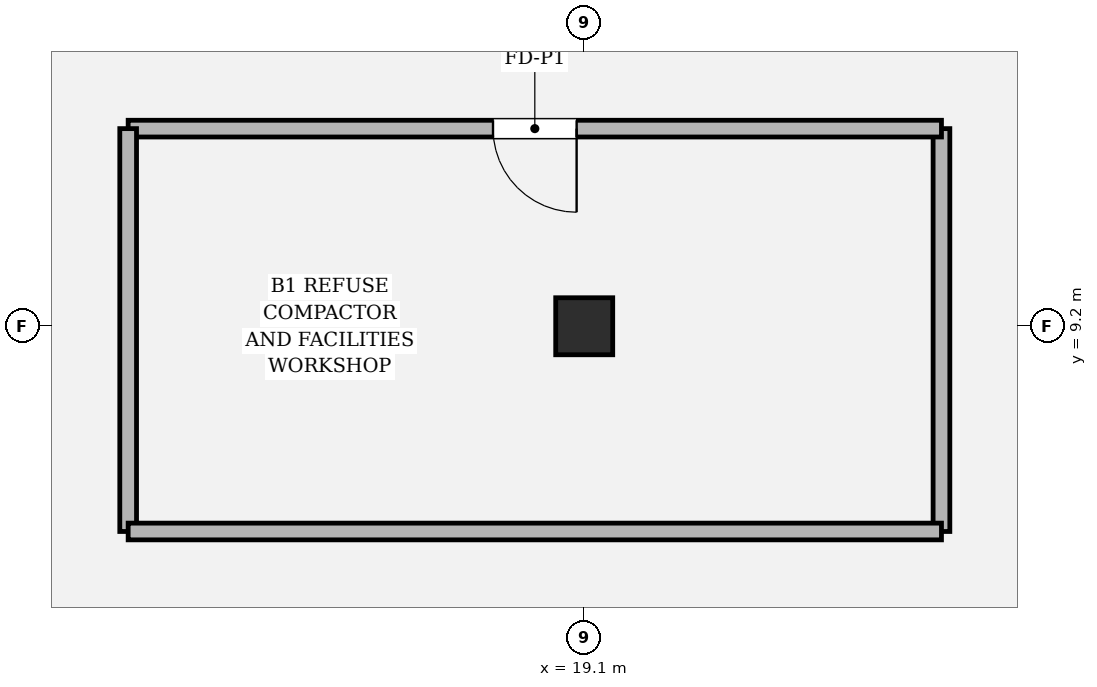
"""IFC4 building model, lengths in metres.
Left out: names, types, materials, properties, quantities, classifications, styles, units other than length and angle.
Written with IfcOpenShell. Run it as: python <this file> out.ifc"""

import sys

from ifc_helpers import new_model, si_unit, direction, frame, frame_2d, origin, origin_2d, place, context, subcontext, project, spatial, rectangle, circle, extrude, element, fill, save


model = new_model("IFC4")
c1 = context("Model", 3, precision=1e-05, world=origin(), true_north=direction((0.0, 1.0)))
c2 = subcontext(c1, "Body", "Model", "MODEL_VIEW")
j1 = project(units=[si_unit("LENGTHUNIT", "METRE"), si_unit("PLANEANGLEUNIT", "RADIAN")], contexts=[c1])
p1 = place(None, origin())
s1 = spatial("IfcSite", under=j1, at=p1, CompositionType="ELEMENT")
p2 = place(p1, origin())
s2 = spatial("IfcBuilding", under=s1, at=p2, CompositionType="ELEMENT")
p3 = place(p2, frame((0.0, 0.0, -4.8)))
s3 = spatial("IfcBuildingStorey", under=s2, at=p3, CompositionType="ELEMENT", Elevation=-4.8)
p4 = place(p3, frame((19.1, 9.2, 0.0), z_axis=(0.0, 0.0, 1.0), x_axis=(1.0, 0.0, 0.0)))
e1 = element("IfcColumn", 1, at=p4, inside=s3, PredefinedType="PILASTER", context=c2, shape_type="SweptSolid", body=[
    extrude(circle(Radius=0.375, at=origin_2d()), origin(), (0.0, 0.0, 1.0), 4.8),
])
p5 = place(p3, frame((23.8, 6.5, 0.0), z_axis=(0.0, 0.0, 1.0), x_axis=(0.0, 1.0, 0.0)))
e2 = element("IfcWall", 2, at=p5, inside=s3, PredefinedType="SOLIDWALL", context=c2, shape_type="SweptSolid", body=[
    extrude(rectangle(XDim=5.3, YDim=0.22, at=frame_2d((2.65, 0.0))), origin(), (0.0, 0.0, 1.0), 3.814),
])
p6 = place(p3, frame((23.8, 11.8, 0.0), z_axis=(0.0, 0.0, 1.0), x_axis=(-1.0, 0.0, 0.0)))
e3 = element("IfcWall", 3, at=p6, inside=s3, PredefinedType="SOLIDWALL", context=c2, shape_type="SweptSolid", body=[
    extrude(rectangle(XDim=10.7, YDim=0.22, at=frame_2d((5.35, 0.0))), origin(), (0.0, 0.0, 1.0), 3.814),
])
p7 = place(p6, frame((4.8, 0.0, 0.0)))
e4 = element("IfcOpeningElement", 4, at=p7, cuts=e3, PredefinedType="OPENING", context=c2, shape_type="SweptSolid", body=[
    extrude(rectangle(XDim=1.1, YDim=2.2, at=frame_2d((0.55, 1.1))), frame((0.0, 0.12, 0.0), z_axis=(0.0, -1.0, 0.0), x_axis=(1.0, 0.0, 0.0)), (0.0, 0.0, 1.0), 0.24),
])
p8 = place(p3, frame((13.1, 11.8, 0.0), z_axis=(0.0, 0.0, 1.0), x_axis=(0.0, -1.0, 0.0)))
e5 = element("IfcWall", 5, at=p8, inside=s3, PredefinedType="SOLIDWALL", context=c2, shape_type="SweptSolid", body=[
    extrude(rectangle(XDim=5.3, YDim=0.22, at=frame_2d((2.65, 0.0))), origin(), (0.0, 0.0, 1.0), 3.814),
])
p9 = place(p3, frame((13.1, 6.5, 0.0), z_axis=(0.0, 0.0, 1.0), x_axis=(1.0, 0.0, 0.0)))
e6 = element("IfcWall", 6, at=p9, inside=s3, PredefinedType="SOLIDWALL", context=c2, shape_type="SweptSolid", body=[
    extrude(rectangle(XDim=10.7, YDim=0.22, at=frame_2d((5.35, 0.0))), origin(), (0.0, 0.0, 1.0), 3.814),
])
p10 = place(p7, origin())
e7 = element("IfcDoor", 7, at=p10, inside=s3, OperationType="SINGLE_SWING_LEFT", PredefinedType="DOOR", context=c2, shape_type="SweptSolid", body=[
    extrude(rectangle(XDim=1.1, YDim=2.2, at=frame_2d((0.55, 1.1))), frame((0.0, 0.025, 0.0), z_axis=(0.0, -1.0, 0.0), x_axis=(1.0, 0.0, 0.0)), (0.0, 0.0, 1.0), 0.05),
])
fill(e4, e7)
save(model, sys.argv[1])
